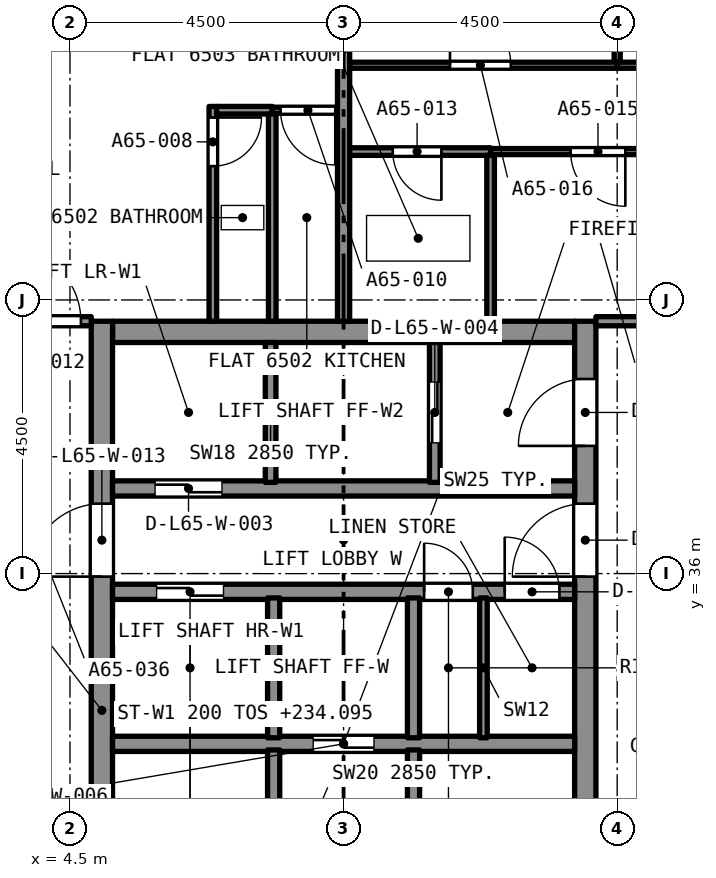
"""IFC4 building model, lengths in metres.
Left out: names, types, materials, properties, quantities, classifications, styles, units other than length and angle.
Written with IfcOpenShell. Run it as: python <this file> out.ifc"""

import sys

from ifc_helpers import new_model, si_unit, direction, frame, frame_2d, origin, place, context, subcontext, project, spatial, rectangle, extrude, element, fill, save


model = new_model("IFC4")
c1 = context("Model", 3, precision=1e-05, world=origin(), true_north=direction((0.0, 1.0)))
c2 = subcontext(c1, "Body", "Model", "MODEL_VIEW")
j1 = project(units=[si_unit("LENGTHUNIT", "METRE"), si_unit("PLANEANGLEUNIT", "RADIAN")], contexts=[c1])
p1 = place(None, origin())
s1 = spatial("IfcSite", under=j1, at=p1, CompositionType="ELEMENT")
p2 = place(p1, origin())
s2 = spatial("IfcBuilding", under=s1, at=p2, CompositionType="ELEMENT")
p3 = place(p2, frame((0.0, 0.0, 232.495)))
s3 = spatial("IfcBuildingStorey", under=s2, at=p3, CompositionType="ELEMENT", Elevation=232.495)
p4 = place(p3, frame((5.2, 39.975, 0.0), z_axis=(0.0, 0.0, 1.0), x_axis=(1.0, 0.0, 0.0)))
e1 = element("IfcWall", 1, at=p4, inside=s3, PredefinedType="SOLIDWALL", context=c2, shape_type="SweptSolid", body=[
    extrude(rectangle(XDim=7.6, YDim=0.35, at=frame_2d((3.8, 0.0))), origin(), (0.0, 0.0, 1.0), 3.2),
])
p5 = place(p3, frame((5.025, 27.35, 0.0), z_axis=(0.0, 0.0, 1.0), x_axis=(0.0, 1.0, 0.0)))
e2 = element("IfcWall", 2, at=p5, inside=s3, PredefinedType="SOLIDWALL", context=c2, shape_type="SweptSolid", body=[
    extrude(rectangle(XDim=12.8, YDim=0.35, at=frame_2d((6.4, 0.0))), origin(), (0.0, 0.0, 1.0), 3.2),
])
p6 = place(p5, frame((8.6, 0.0, 0.0)))
e3 = element("IfcOpeningElement", 3, at=p6, cuts=e2, PredefinedType="OPENING", context=c2, shape_type="SweptSolid", body=[
    extrude(rectangle(XDim=1.2, YDim=2.1, at=frame_2d((0.6, 1.05))), frame((0.0, 0.185, 0.0), z_axis=(0.0, -1.0, 0.0), x_axis=(1.0, 0.0, 0.0)), (0.0, 0.0, 1.0), 0.37),
])
p7 = place(p3, frame((12.975, 27.35, 0.0), z_axis=(0.0, 0.0, 1.0), x_axis=(0.0, 1.0, 0.0)))
e4 = element("IfcWall", 4, at=p7, inside=s3, PredefinedType="SOLIDWALL", context=c2, shape_type="SweptSolid", body=[
    extrude(rectangle(XDim=12.8, YDim=0.35, at=frame_2d((6.4, 0.0))), origin(), (0.0, 0.0, 1.0), 3.2),
])
p8 = place(p7, frame((10.75, 0.0, 0.0)))
e5 = element("IfcOpeningElement", 5, at=p8, cuts=e4, PredefinedType="OPENING", context=c2, shape_type="SweptSolid", body=[
    extrude(rectangle(XDim=1.1, YDim=2.1, at=frame_2d((0.55, 1.05))), frame((0.0, 0.185, 0.0), z_axis=(0.0, -1.0, 0.0), x_axis=(1.0, 0.0, 0.0)), (0.0, 0.0, 1.0), 0.37),
])
p9 = place(p7, frame((8.6, 0.0, 0.0)))
e6 = element("IfcOpeningElement", 6, at=p9, cuts=e4, PredefinedType="OPENING", context=c2, shape_type="SweptSolid", body=[
    extrude(rectangle(XDim=1.2, YDim=2.1, at=frame_2d((0.6, 1.05))), frame((0.0, 0.185, 0.0), z_axis=(0.0, -1.0, 0.0), x_axis=(1.0, 0.0, 0.0)), (0.0, 0.0, 1.0), 0.37),
])
p10 = place(p3, frame((6.85, 43.683, 0.0), z_axis=(0.0, 0.0, 1.0), x_axis=(0.0, -1.0, 0.0)))
e7 = element("IfcWall", 7, at=p10, inside=s3, PredefinedType="PARTITIONING", context=c2, shape_type="SweptSolid", body=[
    extrude(rectangle(XDim=3.533, YDim=0.125, at=frame_2d((1.766, 0.0))), origin(), (0.0, 0.0, 1.0), 2.85),
])
p11 = place(p10, frame((0.183, 0.0, 0.0)))
e8 = element("IfcOpeningElement", 8, at=p11, cuts=e7, PredefinedType="OPENING", context=c2, shape_type="SweptSolid", body=[
    extrude(rectangle(XDim=0.8, YDim=2.1, at=frame_2d((0.4, 1.05))), frame((0.0, 0.073, 0.0), z_axis=(0.0, -1.0, 0.0), x_axis=(1.0, 0.0, 0.0)), (0.0, 0.0, 1.0), 0.145),
])
p12 = place(p3, frame((6.913, 43.62, 0.0), z_axis=(0.0, 0.0, 1.0), x_axis=(1.0, 0.0, 0.0)))
e9 = element("IfcWall", 9, at=p12, inside=s3, PredefinedType="PARTITIONING", context=c2, shape_type="SweptSolid", body=[
    extrude(rectangle(XDim=0.915, YDim=0.125, at=frame_2d((0.458, 0.0))), origin(), (0.0, 0.0, 1.0), 2.85),
])
p13 = place(p3, frame((7.827, 40.15, 0.0), z_axis=(0.0, 0.0, 1.0), x_axis=(0.0, 1.0, 0.0)))
e10 = element("IfcWall", 10, at=p13, inside=s3, PredefinedType="PARTITIONING", context=c2, shape_type="SweptSolid", body=[
    extrude(rectangle(XDim=3.408, YDim=0.125, at=frame_2d((1.704, 0.0))), origin(), (0.0, 0.0, 1.0), 2.85),
])
p14 = place(p3, frame((8.9, 43.62, 0.0), z_axis=(0.0, 0.0, 1.0), x_axis=(-1.0, 0.0, 0.0)))
e11 = element("IfcWall", 11, at=p14, inside=s3, PredefinedType="PARTITIONING", context=c2, shape_type="SweptSolid", body=[
    extrude(rectangle(XDim=1.073, YDim=0.1, at=frame_2d((0.536, 0.0))), origin(), (0.0, 0.0, 1.0), 2.85),
])
p15 = place(p14, frame((0.036, 0.0, 0.0)))
e12 = element("IfcOpeningElement", 12, at=p15, cuts=e11, PredefinedType="OPENING", context=c2, shape_type="SweptSolid", body=[
    extrude(rectangle(XDim=0.9, YDim=2.1, at=frame_2d((0.45, 1.05))), frame((0.0, 0.06, 0.0), z_axis=(0.0, -1.0, 0.0), x_axis=(1.0, 0.0, 0.0)), (0.0, 0.0, 1.0), 0.12),
])
p16 = place(p3, frame((3.35, 40.15, 0.0), z_axis=(0.0, 0.0, 1.0), x_axis=(1.0, 0.0, 0.0)))
e13 = element("IfcWall", 13, at=p16, inside=s3, PredefinedType="PARTITIONING", context=c2, shape_type="SweptSolid", body=[
    extrude(rectangle(XDim=1.5, YDim=0.15, at=frame_2d((0.75, 0.0))), origin(), (0.0, 0.0, 1.0), 2.85),
])
p17 = place(p16, frame((0.13, 0.0, 0.0)))
e14 = element("IfcOpeningElement", 14, at=p17, cuts=e13, PredefinedType="OPENING", context=c2, shape_type="SweptSolid", body=[
    extrude(rectangle(XDim=1.2, YDim=2.4, at=frame_2d((0.6, 1.2))), frame((0.0, 0.085, 0.0), z_axis=(0.0, -1.0, 0.0), x_axis=(1.0, 0.0, 0.0)), (0.0, 0.0, 1.0), 0.17),
])
p18 = place(p3, frame((9.0, 40.15, 0.0), z_axis=(0.0, 0.0, 1.0), x_axis=(0.0, 1.0, 0.0)))
e15 = element("IfcWall", 15, at=p18, inside=s3, PredefinedType="PARTITIONING", context=c2, shape_type="SweptSolid", body=[
    extrude(rectangle(XDim=8.95, YDim=0.2, at=frame_2d((4.475, 0.0))), origin(), (0.0, 0.0, 1.0), 2.85),
])
p19 = place(p3, frame((11.418, 42.94, 0.0), z_axis=(0.0, 0.0, 1.0), x_axis=(-1.0, 0.0, 0.0)))
e16 = element("IfcWall", 16, at=p19, inside=s3, PredefinedType="PARTITIONING", context=c2, shape_type="SweptSolid", body=[
    extrude(rectangle(XDim=2.318, YDim=0.125, at=frame_2d((1.159, 0.0))), origin(), (0.0, 0.0, 1.0), 2.85),
])
p20 = place(p19, frame((0.809, 0.0, 0.0)))
e17 = element("IfcOpeningElement", 17, at=p20, cuts=e16, PredefinedType="OPENING", context=c2, shape_type="SweptSolid", body=[
    extrude(rectangle(XDim=0.8, YDim=2.1, at=frame_2d((0.4, 1.05))), frame((0.0, 0.073, 0.0), z_axis=(0.0, -1.0, 0.0), x_axis=(1.0, 0.0, 0.0)), (0.0, 0.0, 1.0), 0.145),
])
p21 = place(p3, frame((11.418, 40.15, 0.0), z_axis=(0.0, 0.0, 1.0), x_axis=(0.0, 1.0, 0.0)))
e18 = element("IfcWall", 18, at=p21, inside=s3, PredefinedType="PARTITIONING", context=c2, shape_type="SweptSolid", body=[
    extrude(rectangle(XDim=2.728, YDim=0.125, at=frame_2d((1.364, 0.0))), origin(), (0.0, 0.0, 1.0), 2.85),
])
p22 = place(p3, frame((13.5, 44.36, 0.0), z_axis=(0.0, 0.0, 1.0), x_axis=(1.0, 0.0, 0.0)))
e19 = element("IfcWall", 19, at=p22, inside=s3, PredefinedType="PARTITIONING", context=c2, shape_type="SweptSolid", body=[
    extrude(rectangle(XDim=4.375, YDim=0.1, at=frame_2d((2.188, 0.0))), origin(), (0.0, 0.0, 1.0), 2.85),
])
p23 = place(p22, frame((1.8, 0.0, 0.0)))
e20 = element("IfcOpeningElement", 20, at=p23, cuts=e19, PredefinedType="OPENING", context=c2, shape_type="SweptSolid", body=[
    extrude(rectangle(XDim=0.9, YDim=2.1, at=frame_2d((0.45, 1.05))), frame((0.0, 0.06, 0.0), z_axis=(0.0, -1.0, 0.0), x_axis=(1.0, 0.0, 0.0)), (0.0, 0.0, 1.0), 0.12),
])
p24 = place(p3, frame((13.5, 44.41, 0.0), z_axis=(0.0, 0.0, 1.0), x_axis=(0.0, 1.0, 0.0)))
e21 = element("IfcWall", 21, at=p24, inside=s3, PredefinedType="PARTITIONING", context=c2, shape_type="SweptSolid", body=[
    extrude(rectangle(XDim=4.69, YDim=0.1, at=frame_2d((2.345, 0.0))), origin(), (0.0, 0.0, 1.0), 2.85),
])
p25 = place(p3, frame((15.0, 42.94, 0.0), z_axis=(0.0, 0.0, 1.0), x_axis=(-1.0, 0.0, 0.0)))
e22 = element("IfcWall", 22, at=p25, inside=s3, PredefinedType="PARTITIONING", context=c2, shape_type="SweptSolid", body=[
    extrude(rectangle(XDim=3.582, YDim=0.1, at=frame_2d((1.791, 0.0))), origin(), (0.0, 0.0, 1.0), 2.85),
])
p26 = place(p25, frame((1.366, 0.0, 0.0)))
e23 = element("IfcOpeningElement", 23, at=p26, cuts=e22, PredefinedType="OPENING", context=c2, shape_type="SweptSolid", body=[
    extrude(rectangle(XDim=0.9, YDim=2.1, at=frame_2d((0.45, 1.05))), frame((0.0, 0.06, 0.0), z_axis=(0.0, -1.0, 0.0), x_axis=(1.0, 0.0, 0.0)), (0.0, 0.0, 1.0), 0.12),
])
p27 = place(p3, frame((9.1, 44.36, 0.0), z_axis=(0.0, 0.0, 1.0), x_axis=(1.0, 0.0, 0.0)))
e24 = element("IfcWall", 24, at=p27, inside=s3, PredefinedType="PARTITIONING", context=c2, shape_type="SweptSolid", body=[
    extrude(rectangle(XDim=4.4, YDim=0.1, at=frame_2d((2.2, 0.0))), origin(), (0.0, 0.0, 1.0), 2.85),
])
p28 = place(p27, frame((1.65, 0.0, 0.0)))
e25 = element("IfcOpeningElement", 25, at=p28, cuts=e24, PredefinedType="OPENING", context=c2, shape_type="SweptSolid", body=[
    extrude(rectangle(XDim=1.0, YDim=2.1, at=frame_2d((0.5, 1.05))), frame((0.0, 0.06, 0.0), z_axis=(0.0, -1.0, 0.0), x_axis=(1.0, 0.0, 0.0)), (0.0, 0.0, 1.0), 0.12),
])
p29 = place(p3, frame((13.15, 40.15, 0.0), z_axis=(0.0, 0.0, 1.0), x_axis=(1.0, 0.0, 0.0)))
e26 = element("IfcWall", 26, at=p29, inside=s3, PredefinedType="PARTITIONING", context=c2, shape_type="SweptSolid", body=[
    extrude(rectangle(XDim=1.8, YDim=0.15, at=frame_2d((0.9, 0.0))), origin(), (0.0, 0.0, 1.0), 2.85),
])
p30 = place(p3, frame((5.2, 33.2, 0.0), z_axis=(0.0, 0.0, 1.0), x_axis=(1.0, 0.0, 0.0)))
e27 = element("IfcWall", 27, at=p30, inside=s3, PredefinedType="SOLIDWALL", context=c2, shape_type="SweptSolid", body=[
    extrude(rectangle(XDim=7.6, YDim=0.25, at=frame_2d((3.8, 0.0))), origin(), (0.0, 0.0, 1.0), 2.85),
])
p31 = place(p30, frame((3.3, 0.0, 0.0)))
e28 = element("IfcOpeningElement", 28, at=p31, cuts=e27, PredefinedType="OPENING", context=c2, shape_type="SweptSolid", body=[
    extrude(rectangle(XDim=1.0, YDim=2.1, at=frame_2d((0.5, 1.05))), frame((0.0, 0.135, 0.0), z_axis=(0.0, -1.0, 0.0), x_axis=(1.0, 0.0, 0.0)), (0.0, 0.0, 1.0), 0.27),
])
p32 = place(p3, frame((5.2, 35.7, 0.0), z_axis=(0.0, 0.0, 1.0), x_axis=(1.0, 0.0, 0.0)))
e29 = element("IfcWall", 29, at=p32, inside=s3, PredefinedType="SOLIDWALL", context=c2, shape_type="SweptSolid", body=[
    extrude(rectangle(XDim=7.6, YDim=0.25, at=frame_2d((3.8, 0.0))), origin(), (0.0, 0.0, 1.0), 2.85),
])
p33 = place(p32, frame((0.725, 0.0, 0.0)))
e30 = element("IfcOpeningElement", 30, at=p33, cuts=e29, PredefinedType="OPENING", context=c2, shape_type="SweptSolid", body=[
    extrude(rectangle(XDim=1.1, YDim=2.4, at=frame_2d((0.55, 1.2))), frame((0.0, 0.135, 0.0), z_axis=(0.0, -1.0, 0.0), x_axis=(1.0, 0.0, 0.0)), (0.0, 0.0, 1.0), 0.27),
])
p34 = place(p32, frame((5.125, 0.0, 0.0)))
e31 = element("IfcOpeningElement", 31, at=p34, cuts=e29, PredefinedType="OPENING", context=c2, shape_type="SweptSolid", body=[
    extrude(rectangle(XDim=0.8, YDim=2.1, at=frame_2d((0.4, 1.05))), frame((0.0, 0.135, 0.0), z_axis=(0.0, -1.0, 0.0), x_axis=(1.0, 0.0, 0.0)), (0.0, 0.0, 1.0), 0.27),
])
p35 = place(p32, frame((6.45, 0.0, 0.0)))
e32 = element("IfcOpeningElement", 32, at=p35, cuts=e29, PredefinedType="OPENING", context=c2, shape_type="SweptSolid", body=[
    extrude(rectangle(XDim=0.9, YDim=2.1, at=frame_2d((0.45, 1.05))), frame((0.0, 0.135, 0.0), z_axis=(0.0, -1.0, 0.0), x_axis=(1.0, 0.0, 0.0)), (0.0, 0.0, 1.0), 0.27),
])
p36 = place(p3, frame((5.2, 37.4, 0.0), z_axis=(0.0, 0.0, 1.0), x_axis=(1.0, 0.0, 0.0)))
e33 = element("IfcWall", 33, at=p36, inside=s3, PredefinedType="SOLIDWALL", context=c2, shape_type="SweptSolid", body=[
    extrude(rectangle(XDim=7.6, YDim=0.25, at=frame_2d((3.8, 0.0))), origin(), (0.0, 0.0, 1.0), 2.85),
])
p37 = place(p36, frame((0.7, 0.0, 0.0)))
e34 = element("IfcOpeningElement", 34, at=p37, cuts=e33, PredefinedType="OPENING", context=c2, shape_type="SweptSolid", body=[
    extrude(rectangle(XDim=1.1, YDim=2.4, at=frame_2d((0.55, 1.2))), frame((0.0, 0.135, 0.0), z_axis=(0.0, -1.0, 0.0), x_axis=(1.0, 0.0, 0.0)), (0.0, 0.0, 1.0), 0.27),
])
p38 = place(p3, frame((7.85, 27.7, 0.0), z_axis=(0.0, 0.0, 1.0), x_axis=(0.0, 1.0, 0.0)))
e35 = element("IfcWall", 35, at=p38, inside=s3, PredefinedType="SOLIDWALL", context=c2, shape_type="SweptSolid", body=[
    extrude(rectangle(XDim=5.4, YDim=0.2, at=frame_2d((2.7, 0.0))), origin(), (0.0, 0.0, 1.0), 2.85),
])
p39 = place(p38, frame((0.2, 0.0, 0.0)))
e36 = element("IfcOpeningElement", 36, at=p39, cuts=e35, PredefinedType="OPENING", context=c2, shape_type="SweptSolid", body=[
    extrude(rectangle(XDim=0.9, YDim=2.1, at=frame_2d((0.45, 1.05))), frame((0.0, 0.11, 0.0), z_axis=(0.0, -1.0, 0.0), x_axis=(1.0, 0.0, 0.0)), (0.0, 0.0, 1.0), 0.22),
])
p40 = place(p3, frame((10.15, 27.7, 0.0), z_axis=(0.0, 0.0, 1.0), x_axis=(0.0, 1.0, 0.0)))
e37 = element("IfcWall", 37, at=p40, inside=s3, PredefinedType="SOLIDWALL", context=c2, shape_type="SweptSolid", body=[
    extrude(rectangle(XDim=5.4, YDim=0.2, at=frame_2d((2.7, 0.0))), origin(), (0.0, 0.0, 1.0), 2.85),
])
p41 = place(p40, frame((0.2, 0.0, 0.0)))
e38 = element("IfcOpeningElement", 38, at=p41, cuts=e37, PredefinedType="OPENING", context=c2, shape_type="SweptSolid", body=[
    extrude(rectangle(XDim=0.9, YDim=2.1, at=frame_2d((0.45, 1.05))), frame((0.0, 0.11, 0.0), z_axis=(0.0, -1.0, 0.0), x_axis=(1.0, 0.0, 0.0)), (0.0, 0.0, 1.0), 0.22),
])
for number, where, z_axis, x_axis in (
    (39, (7.85, 33.3, 0.0), (0.0, 0.0, 1.0), (0.0, 1.0, 0.0)),
    (40, (10.15, 33.3, 0.0), (0.0, 0.0, 1.0), (0.0, 1.0, 0.0)),
):
    element("IfcWall", number, at=place(p3, frame(where, z_axis=z_axis, x_axis=x_axis)), inside=s3, PredefinedType="SOLIDWALL", context=c2, shape_type="SweptSolid", body=[
        extrude(rectangle(XDim=2.3, YDim=0.2, at=frame_2d((1.15, 0.0))), origin(), (0.0, 0.0, 1.0), 2.85),
    ])
p42 = place(p3, frame((7.8, 37.5, 0.0), z_axis=(0.0, 0.0, 1.0), x_axis=(0.0, 1.0, 0.0)))
e41 = element("IfcWall", 41, at=p42, inside=s3, PredefinedType="SOLIDWALL", context=c2, shape_type="SweptSolid", body=[
    extrude(rectangle(XDim=2.3, YDim=0.175, at=frame_2d((1.15, 0.0))), origin(), (0.0, 0.0, 1.0), 2.85),
])
p43 = place(p3, frame((10.5, 37.5, 0.0), z_axis=(0.0, 0.0, 1.0), x_axis=(0.0, 1.0, 0.0)))
e42 = element("IfcWall", 42, at=p43, inside=s3, PredefinedType="SOLIDWALL", context=c2, shape_type="SweptSolid", body=[
    extrude(rectangle(XDim=2.3, YDim=0.175, at=frame_2d((1.15, 0.0))), origin(), (0.0, 0.0, 1.0), 2.85),
])
p44 = place(p43, frame((0.65, 0.0, 0.0)))
e43 = element("IfcOpeningElement", 43, at=p44, cuts=e42, PredefinedType="OPENING", context=c2, shape_type="SweptSolid", body=[
    extrude(rectangle(XDim=1.0, YDim=2.1, at=frame_2d((0.5, 1.05))), frame((0.0, 0.097, 0.0), z_axis=(0.0, -1.0, 0.0), x_axis=(1.0, 0.0, 0.0)), (0.0, 0.0, 1.0), 0.195),
])
p45 = place(p3, frame((11.3, 33.3, 0.0), z_axis=(0.0, 0.0, 1.0), x_axis=(0.0, 1.0, 0.0)))
e44 = element("IfcWall", 44, at=p45, inside=s3, PredefinedType="PARTITIONING", context=c2, shape_type="SweptSolid", body=[
    extrude(rectangle(XDim=2.3, YDim=0.125, at=frame_2d((1.15, 0.0))), origin(), (0.0, 0.0, 1.0), 2.85),
])
p46 = place(p11, origin())
e45 = element("IfcDoor", 45, at=p46, inside=s3, OperationType="SINGLE_SWING_LEFT", PredefinedType="DOOR", context=c2, shape_type="SweptSolid", body=[
    extrude(rectangle(XDim=0.8, YDim=2.1, at=frame_2d((0.4, 1.05))), frame((0.0, 0.025, 0.0), z_axis=(0.0, -1.0, 0.0), x_axis=(1.0, 0.0, 0.0)), (0.0, 0.0, 1.0), 0.05),
])
fill(e8, e45)
p47 = place(p15, origin())
e46 = element("IfcDoor", 46, at=p47, inside=s3, OperationType="SINGLE_SWING_LEFT", PredefinedType="DOOR", context=c2, shape_type="SweptSolid", body=[
    extrude(rectangle(XDim=0.9, YDim=2.1, at=frame_2d((0.45, 1.05))), frame((0.0, 0.025, 0.0), z_axis=(0.0, -1.0, 0.0), x_axis=(1.0, 0.0, 0.0)), (0.0, 0.0, 1.0), 0.05),
])
fill(e12, e46)
p48 = place(p17, origin())
e47 = element("IfcDoor", 47, at=p48, inside=s3, OperationType="SINGLE_SWING_LEFT", PredefinedType="DOOR", context=c2, shape_type="SweptSolid", body=[
    extrude(rectangle(XDim=1.2, YDim=2.4, at=frame_2d((0.6, 1.2))), frame((0.0, 0.025, 0.0), z_axis=(0.0, -1.0, 0.0), x_axis=(1.0, 0.0, 0.0)), (0.0, 0.0, 1.0), 0.05),
])
fill(e14, e47)
p49 = place(p20, origin())
e48 = element("IfcDoor", 48, at=p49, inside=s3, OperationType="SINGLE_SWING_RIGHT", PredefinedType="DOOR", context=c2, shape_type="SweptSolid", body=[
    extrude(rectangle(XDim=0.8, YDim=2.1, at=frame_2d((0.4, 1.05))), frame((0.0, 0.025, 0.0), z_axis=(0.0, -1.0, 0.0), x_axis=(1.0, 0.0, 0.0)), (0.0, 0.0, 1.0), 0.05),
])
fill(e17, e48)
p50 = place(p26, origin())
e49 = element("IfcDoor", 49, at=p50, inside=s3, OperationType="SINGLE_SWING_RIGHT", PredefinedType="DOOR", context=c2, shape_type="SweptSolid", body=[
    extrude(rectangle(XDim=0.9, YDim=2.1, at=frame_2d((0.45, 1.05))), frame((0.0, 0.025, 0.0), z_axis=(0.0, -1.0, 0.0), x_axis=(1.0, 0.0, 0.0)), (0.0, 0.0, 1.0), 0.05),
])
fill(e23, e49)
p51 = place(p28, origin())
e50 = element("IfcDoor", 50, at=p51, inside=s3, OperationType="SINGLE_SWING_LEFT", PredefinedType="DOOR", context=c2, shape_type="SweptSolid", body=[
    extrude(rectangle(XDim=1.0, YDim=2.1, at=frame_2d((0.5, 1.05))), frame((0.0, 0.025, 0.0), z_axis=(0.0, -1.0, 0.0), x_axis=(1.0, 0.0, 0.0)), (0.0, 0.0, 1.0), 0.05),
])
fill(e25, e50)
p52 = place(p37, origin())
e51 = element("IfcDoor", 51, at=p52, inside=s3, OperationType="SLIDING_TO_LEFT", PredefinedType="DOOR", context=c2, shape_type="SweptSolid", body=[
    extrude(rectangle(XDim=1.1, YDim=2.4, at=frame_2d((0.55, 1.2))), frame((0.0, 0.025, 0.0), z_axis=(0.0, -1.0, 0.0), x_axis=(1.0, 0.0, 0.0)), (0.0, 0.0, 1.0), 0.05),
])
fill(e34, e51)
p53 = place(p44, origin())
e52 = element("IfcDoor", 52, at=p53, inside=s3, OperationType="SLIDING_TO_LEFT", PredefinedType="DOOR", context=c2, shape_type="SweptSolid", body=[
    extrude(rectangle(XDim=1.0, YDim=2.1, at=frame_2d((0.5, 1.05))), frame((0.0, 0.025, 0.0), z_axis=(0.0, -1.0, 0.0), x_axis=(1.0, 0.0, 0.0)), (0.0, 0.0, 1.0), 0.05),
])
fill(e43, e52)
p54 = place(p33, origin())
e53 = element("IfcDoor", 53, at=p54, inside=s3, OperationType="SLIDING_TO_LEFT", PredefinedType="DOOR", context=c2, shape_type="SweptSolid", body=[
    extrude(rectangle(XDim=1.1, YDim=2.4, at=frame_2d((0.55, 1.2))), frame((0.0, 0.025, 0.0), z_axis=(0.0, -1.0, 0.0), x_axis=(1.0, 0.0, 0.0)), (0.0, 0.0, 1.0), 0.05),
])
fill(e30, e53)
p55 = place(p31, origin())
e54 = element("IfcDoor", 54, at=p55, inside=s3, OperationType="SLIDING_TO_LEFT", PredefinedType="DOOR", context=c2, shape_type="SweptSolid", body=[
    extrude(rectangle(XDim=1.0, YDim=2.1, at=frame_2d((0.5, 1.05))), frame((0.0, 0.025, 0.0), z_axis=(0.0, -1.0, 0.0), x_axis=(1.0, 0.0, 0.0)), (0.0, 0.0, 1.0), 0.05),
])
fill(e28, e54)
p56 = place(p34, origin())
e55 = element("IfcDoor", 55, at=p56, inside=s3, OperationType="SINGLE_SWING_LEFT", PredefinedType="DOOR", context=c2, shape_type="SweptSolid", body=[
    extrude(rectangle(XDim=0.8, YDim=2.1, at=frame_2d((0.4, 1.05))), frame((0.0, 0.025, 0.0), z_axis=(0.0, -1.0, 0.0), x_axis=(1.0, 0.0, 0.0)), (0.0, 0.0, 1.0), 0.05),
])
fill(e31, e55)
p57 = place(p35, origin())
e56 = element("IfcDoor", 56, at=p57, inside=s3, OperationType="SINGLE_SWING_LEFT", PredefinedType="DOOR", context=c2, shape_type="SweptSolid", body=[
    extrude(rectangle(XDim=0.9, YDim=2.1, at=frame_2d((0.45, 1.05))), frame((0.0, 0.025, 0.0), z_axis=(0.0, -1.0, 0.0), x_axis=(1.0, 0.0, 0.0)), (0.0, 0.0, 1.0), 0.05),
])
fill(e32, e56)
p58 = place(p8, origin())
e57 = element("IfcDoor", 57, at=p58, inside=s3, OperationType="SINGLE_SWING_LEFT", PredefinedType="DOOR", context=c2, shape_type="SweptSolid", body=[
    extrude(rectangle(XDim=1.1, YDim=2.1, at=frame_2d((0.55, 1.05))), frame((0.0, 0.025, 0.0), z_axis=(0.0, -1.0, 0.0), x_axis=(1.0, 0.0, 0.0)), (0.0, 0.0, 1.0), 0.05),
])
fill(e5, e57)
p59 = place(p6, origin())
e58 = element("IfcDoor", 58, at=p59, inside=s3, OperationType="SINGLE_SWING_LEFT", PredefinedType="DOOR", context=c2, shape_type="SweptSolid", body=[
    extrude(rectangle(XDim=1.2, YDim=2.1, at=frame_2d((0.6, 1.05))), frame((0.0, 0.025, 0.0), z_axis=(0.0, -1.0, 0.0), x_axis=(1.0, 0.0, 0.0)), (0.0, 0.0, 1.0), 0.05),
])
fill(e3, e58)
p60 = place(p9, origin())
e59 = element("IfcDoor", 59, at=p60, inside=s3, OperationType="SINGLE_SWING_LEFT", PredefinedType="DOOR", context=c2, shape_type="SweptSolid", body=[
    extrude(rectangle(XDim=1.2, YDim=2.1, at=frame_2d((0.6, 1.05))), frame((0.0, 0.025, 0.0), z_axis=(0.0, -1.0, 0.0), x_axis=(1.0, 0.0, 0.0)), (0.0, 0.0, 1.0), 0.05),
])
fill(e6, e59)
save(model, sys.argv[1])
